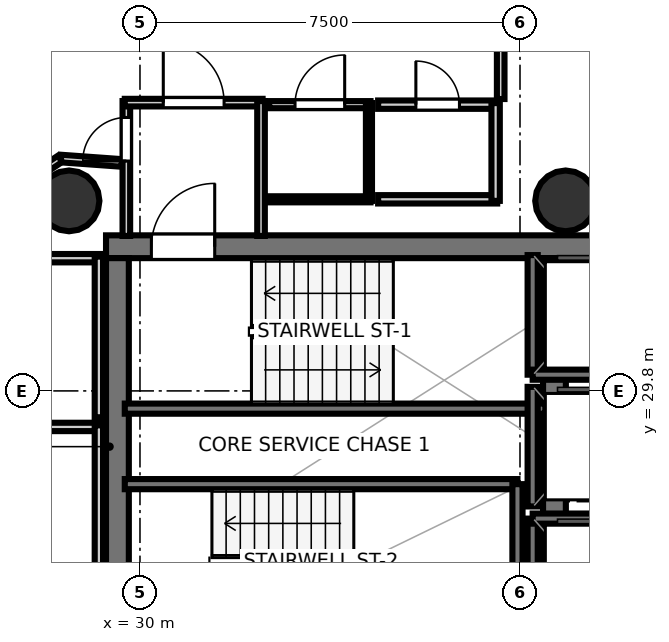
"""IFC4 building model, lengths in metres.
Left out: names, types, materials, properties, quantities, classifications, styles, units other than length and angle.
Written with IfcOpenShell. Run it as: python <this file> out.ifc"""

import sys

from ifc_helpers import new_model, si_unit, direction, frame, frame_2d, origin, origin_2d, place, context, subcontext, project, spatial, rectangle, hollow_circle, extrude, element, fill, save


model = new_model("IFC4")
c1 = context("Model", 3, precision=1e-05, world=origin(), true_north=direction((0.0, 1.0)))
c2 = subcontext(c1, "Body", "Model", "MODEL_VIEW")
j1 = project(units=[si_unit("LENGTHUNIT", "METRE"), si_unit("PLANEANGLEUNIT", "RADIAN")], contexts=[c1])
p1 = place(None, origin())
s1 = spatial("IfcSite", under=j1, at=p1, CompositionType="ELEMENT")
p2 = place(p1, origin())
s2 = spatial("IfcBuilding", under=s1, at=p2, CompositionType="ELEMENT")
p3 = place(p2, frame((0.0, 0.0, 215.1)))
s3 = spatial("IfcBuildingStorey", under=s2, at=p3, CompositionType="ELEMENT", Elevation=215.1)
p4 = place(p3, frame((29.33, 32.645, 0.0), z_axis=(0.0, 0.0, 1.0), x_axis=(1.0, 0.0, 0.0)))
e1 = element("IfcWall", 1, at=p4, inside=s3, PredefinedType="SHEAR", context=c2, shape_type="SweptSolid", body=[
    extrude(rectangle(XDim=10.52, YDim=0.45, at=frame_2d((5.26, 0.0))), origin(), (0.0, 0.0, 1.0), 3.52),
])
p5 = place(p4, frame((0.895, 0.0, 0.0)))
e2 = element("IfcOpeningElement", 2, at=p5, cuts=e1, PredefinedType="OPENING", context=c2, shape_type="SweptSolid", body=[
    extrude(rectangle(XDim=1.25, YDim=2.15, at=frame_2d((0.625, 1.075))), frame((0.0, 0.235, 0.0), z_axis=(0.0, -1.0, 0.0), x_axis=(1.0, 0.0, 0.0)), (0.0, 0.0, 1.0), 0.47),
])
for number, where, z_axis, x_axis in (
    (3, (29.555, 24.98, 0.0), (0.0, 0.0, 1.0), (0.0, 1.0, 0.0)),
    (4, (38.18, 24.98, 0.0), (0.0, 0.0, 1.0), (0.0, 1.0, 0.0)),
):
    element("IfcWall", number, at=place(p3, frame(where, z_axis=z_axis, x_axis=x_axis)), inside=s3, PredefinedType="SHEAR", context=c2, shape_type="SweptSolid", body=[
        extrude(rectangle(XDim=7.44, YDim=0.45, at=frame_2d((3.72, 0.0))), origin(), (0.0, 0.0, 1.0), 3.52),
    ])
for number, where, z_axis, x_axis in (
    (5, (28.6, 33.55, 0.0), (0.0, 0.0, 1.0), (1.0, 0.0, 0.0)),
    (6, (38.4, 33.55, 0.0), (0.0, 0.0, 1.0), (1.0, 0.0, 0.0)),
):
    element("IfcColumn", number, at=place(p3, frame(where, z_axis=z_axis, x_axis=x_axis)), inside=s3, PredefinedType="COLUMN", context=c2, shape_type="SweptSolid", body=[
        extrude(hollow_circle(Radius=0.6, WallThickness=0.03, at=origin_2d()), origin(), (0.0, 0.0, 1.0), 3.7),
    ])
p6 = place(p3, frame((29.7, 29.45, 0.0), z_axis=(0.0, 0.0, 1.0), x_axis=(1.0, 0.0, 0.0)))
e7 = element("IfcWall", 7, at=p6, inside=s3, PredefinedType="SOLIDWALL", context=c2, shape_type="SweptSolid", body=[
    extrude(rectangle(XDim=8.3, YDim=0.2, at=frame_2d((4.15, 0.0))), origin(), (0.0, 0.0, 1.0), 3.52),
])
p7 = place(p3, frame((29.7, 27.96, 0.0), z_axis=(0.0, 0.0, 1.0), x_axis=(1.0, 0.0, 0.0)))
e8 = element("IfcWall", 8, at=p7, inside=s3, PredefinedType="SOLIDWALL", context=c2, shape_type="SweptSolid", body=[
    extrude(rectangle(XDim=7.75, YDim=0.2, at=frame_2d((3.875, 0.0))), origin(), (0.0, 0.0, 1.0), 3.52),
])
p8 = place(p3, frame((37.45, 24.9, 0.0), z_axis=(0.0, 0.0, 1.0), x_axis=(0.0, 1.0, 0.0)))
e9 = element("IfcWall", 9, at=p8, inside=s3, PredefinedType="SOLIDWALL", context=c2, shape_type="SweptSolid", body=[
    extrude(rectangle(XDim=3.06, YDim=0.2, at=frame_2d((1.53, 0.0))), origin(), (0.0, 0.0, 1.0), 3.52),
])
p9 = place(p3, frame((37.75, 30.12, 0.0), z_axis=(0.0, 0.0, 1.0), x_axis=(0.0, 1.0, 0.0)))
e10 = element("IfcWall", 10, at=p9, inside=s3, PredefinedType="SOLIDWALL", context=c2, shape_type="SweptSolid", body=[
    extrude(rectangle(XDim=2.36, YDim=0.2, at=frame_2d((1.18, 0.0))), origin(), (0.0, 0.0, 1.0), 3.52),
])
p10 = place(p3, frame((37.75, 30.12, 0.0), z_axis=(0.0, 0.0, 1.0), x_axis=(1.0, 0.0, 0.0)))
e11 = element("IfcWall", 11, at=p10, inside=s3, PredefinedType="SOLIDWALL", context=c2, shape_type="SweptSolid", body=[
    extrude(rectangle(XDim=2.1, YDim=0.2, at=frame_2d((1.05, 0.0))), origin(), (0.0, 0.0, 1.0), 3.52),
])
p11 = place(p3, frame((37.75, 24.92, 0.0), z_axis=(0.0, 0.0, 1.0), x_axis=(0.0, 1.0, 0.0)))
e12 = element("IfcWall", 12, at=p11, inside=s3, PredefinedType="SOLIDWALL", context=c2, shape_type="SweptSolid", body=[
    extrude(rectangle(XDim=2.36, YDim=0.2, at=frame_2d((1.18, 0.0))), origin(), (0.0, 0.0, 1.0), 3.52),
])
p12 = place(p3, frame((37.75, 27.28, 0.0), z_axis=(0.0, 0.0, 1.0), x_axis=(1.0, 0.0, 0.0)))
e13 = element("IfcWall", 13, at=p12, inside=s3, PredefinedType="SOLIDWALL", context=c2, shape_type="SweptSolid", body=[
    extrude(rectangle(XDim=2.1, YDim=0.2, at=frame_2d((1.05, 0.0))), origin(), (0.0, 0.0, 1.0), 3.52),
])
p13 = place(p3, frame((37.75, 27.52, 0.0), z_axis=(0.0, 0.0, 1.0), x_axis=(0.0, 1.0, 0.0)))
e14 = element("IfcWall", 14, at=p13, inside=s3, PredefinedType="SOLIDWALL", context=c2, shape_type="SweptSolid", body=[
    extrude(rectangle(XDim=2.36, YDim=0.2, at=frame_2d((1.18, 0.0))), origin(), (0.0, 0.0, 1.0), 3.52),
])
p14 = place(p3, frame((29.731, 32.858, 0.0), z_axis=(0.0, 0.0, 1.0), x_axis=(0.0, 1.0, 0.0)))
e15 = element("IfcWall", 15, at=p14, inside=s3, PredefinedType="PARTITIONING", context=c2, shape_type="SweptSolid", body=[
    extrude(rectangle(XDim=2.662, YDim=0.15, at=frame_2d((1.331, 0.0))), origin(), (0.0, 0.0, 1.0), 2.84),
])
p15 = place(p14, frame((1.478, 0.0, 0.0)))
e16 = element("IfcOpeningElement", 16, at=p15, cuts=e15, PredefinedType="OPENING", context=c2, shape_type="SweptSolid", body=[
    extrude(rectangle(XDim=0.86, YDim=2.05, at=frame_2d((0.43, 1.025))), frame((0.0, 0.085, 0.0), z_axis=(0.0, -1.0, 0.0), x_axis=(1.0, 0.0, 0.0)), (0.0, 0.0, 1.0), 0.17),
])
p16 = place(p3, frame((29.7, 35.489, 0.0), z_axis=(0.0, 0.0, 1.0), x_axis=(1.0, 0.0, 0.0)))
e17 = element("IfcWall", 17, at=p16, inside=s3, PredefinedType="PARTITIONING", context=c2, shape_type="SweptSolid", body=[
    extrude(rectangle(XDim=2.72, YDim=0.15, at=frame_2d((1.36, 0.0))), origin(), (0.0, 0.0, 1.0), 2.84),
])
p17 = place(p16, frame((0.76, 0.0, 0.0)))
e18 = element("IfcOpeningElement", 18, at=p17, cuts=e17, PredefinedType="OPENING", context=c2, shape_type="SweptSolid", body=[
    extrude(rectangle(XDim=1.2, YDim=2.15, at=frame_2d((0.6, 1.075))), frame((0.0, 0.085, 0.0), z_axis=(0.0, -1.0, 0.0), x_axis=(1.0, 0.0, 0.0)), (0.0, 0.0, 1.0), 0.17),
])
p18 = place(p3, frame((32.389, 35.52, 0.0), z_axis=(0.0, 0.0, 1.0), x_axis=(0.0, -1.0, 0.0)))
e19 = element("IfcWall", 19, at=p18, inside=s3, PredefinedType="PARTITIONING", context=c2, shape_type="SweptSolid", body=[
    extrude(rectangle(XDim=2.662, YDim=0.15, at=frame_2d((1.331, 0.0))), origin(), (0.0, 0.0, 1.0), 2.84),
])
p19 = place(p3, frame((34.55, 33.581, 0.0), z_axis=(0.0, 0.0, 1.0), x_axis=(-1.0, 0.0, 0.0)))
e20 = element("IfcWall", 20, at=p19, inside=s3, PredefinedType="PARTITIONING", context=c2, shape_type="SweptSolid", body=[
    extrude(rectangle(XDim=2.0, YDim=0.12, at=frame_2d((1.0, 0.0))), origin(), (0.0, 0.0, 1.0), 2.84),
])
p20 = place(p3, frame((32.55, 35.449, 0.0), z_axis=(0.0, 0.0, 1.0), x_axis=(1.0, 0.0, 0.0)))
e21 = element("IfcWall", 21, at=p20, inside=s3, PredefinedType="PARTITIONING", context=c2, shape_type="SweptSolid", body=[
    extrude(rectangle(XDim=2.0, YDim=0.14, at=frame_2d((1.0, 0.0))), origin(), (0.0, 0.0, 1.0), 2.84),
])
p21 = place(p20, frame((0.51, 0.0, 0.0)))
e22 = element("IfcOpeningElement", 22, at=p21, cuts=e21, PredefinedType="OPENING", context=c2, shape_type="SweptSolid", body=[
    extrude(rectangle(XDim=0.98, YDim=2.1, at=frame_2d((0.49, 1.05))), frame((0.0, 0.08, 0.0), z_axis=(0.0, -1.0, 0.0), x_axis=(1.0, 0.0, 0.0)), (0.0, 0.0, 1.0), 0.16),
])
p22 = place(p3, frame((34.519, 35.48, 0.0), z_axis=(0.0, 0.0, 1.0), x_axis=(0.0, -1.0, 0.0)))
e23 = element("IfcWall", 23, at=p22, inside=s3, PredefinedType="PARTITIONING", context=c2, shape_type="SweptSolid", body=[
    extrude(rectangle(XDim=1.93, YDim=0.12, at=frame_2d((0.965, 0.0))), origin(), (0.0, 0.0, 1.0), 2.84),
])
p23 = place(p3, frame((37.05, 33.581, 0.0), z_axis=(0.0, 0.0, 1.0), x_axis=(-1.0, 0.0, 0.0)))
e24 = element("IfcWall", 24, at=p23, inside=s3, PredefinedType="PLUMBINGWALL", context=c2, shape_type="SweptSolid", body=[
    extrude(rectangle(XDim=2.35, YDim=0.165, at=frame_2d((1.175, 0.0))), origin(), (0.0, 0.0, 1.0), 2.84),
])
p24 = place(p3, frame((34.7, 35.449, 0.0), z_axis=(0.0, 0.0, 1.0), x_axis=(1.0, 0.0, 0.0)))
e25 = element("IfcWall", 25, at=p24, inside=s3, PredefinedType="PLUMBINGWALL", context=c2, shape_type="SweptSolid", body=[
    extrude(rectangle(XDim=2.35, YDim=0.165, at=frame_2d((1.175, 0.0))), origin(), (0.0, 0.0, 1.0), 2.84),
])
p25 = place(p24, frame((0.745, 0.0, 0.0)))
e26 = element("IfcOpeningElement", 26, at=p25, cuts=e25, PredefinedType="OPENING", context=c2, shape_type="SweptSolid", body=[
    extrude(rectangle(XDim=0.86, YDim=2.05, at=frame_2d((0.43, 1.025))), frame((0.0, 0.093, 0.0), z_axis=(0.0, -1.0, 0.0), x_axis=(1.0, 0.0, 0.0)), (0.0, 0.0, 1.0), 0.185),
])
p26 = place(p3, frame((37.019, 35.48, 0.0), z_axis=(0.0, 0.0, 1.0), x_axis=(0.0, -1.0, 0.0)))
e27 = element("IfcWall", 27, at=p26, inside=s3, PredefinedType="PLUMBINGWALL", context=c2, shape_type="SweptSolid", body=[
    extrude(rectangle(XDim=1.93, YDim=0.165, at=frame_2d((0.965, 0.0))), origin(), (0.0, 0.0, 1.0), 2.84),
])
p27 = place(p3, frame((27.72, 29.089, 0.0), z_axis=(0.0, 0.0, 1.0), x_axis=(1.0, 0.0, 0.0)))
e28 = element("IfcWall", 28, at=p27, inside=s3, PredefinedType="PLUMBINGWALL", context=c2, shape_type="SweptSolid", body=[
    extrude(rectangle(XDim=1.5, YDim=0.165, at=frame_2d((0.75, 0.0))), origin(), (0.0, 0.0, 1.0), 2.84),
])
p28 = place(p3, frame((29.189, 29.12, 0.0), z_axis=(0.0, 0.0, 1.0), x_axis=(0.0, -1.0, 0.0)))
e29 = element("IfcWall", 29, at=p28, inside=s3, PredefinedType="PLUMBINGWALL", context=c2, shape_type="SweptSolid", body=[
    extrude(rectangle(XDim=4.12, YDim=0.165, at=frame_2d((2.06, 0.0))), origin(), (0.0, 0.0, 1.0), 2.84),
])
p29 = place(p3, frame((27.72, 32.419, 0.0), z_axis=(0.0, 0.0, 1.0), x_axis=(1.0, 0.0, 0.0)))
e30 = element("IfcWall", 30, at=p29, inside=s3, PredefinedType="PLUMBINGWALL", context=c2, shape_type="SweptSolid", body=[
    extrude(rectangle(XDim=1.5, YDim=0.165, at=frame_2d((0.75, 0.0))), origin(), (0.0, 0.0, 1.0), 2.84),
])
p30 = place(p3, frame((29.189, 32.45, 0.0), z_axis=(0.0, 0.0, 1.0), x_axis=(0.0, -1.0, 0.0)))
e31 = element("IfcWall", 31, at=p30, inside=s3, PredefinedType="PLUMBINGWALL", context=c2, shape_type="SweptSolid", body=[
    extrude(rectangle(XDim=3.17, YDim=0.165, at=frame_2d((1.585, 0.0))), origin(), (0.0, 0.0, 1.0), 2.84),
])
p31 = place(p3, frame((37.119, 37.816, 0.0), z_axis=(0.0, 0.0, 1.0), x_axis=(0.0, -1.0, 0.0)))
e32 = element("IfcWall", 32, at=p31, inside=s3, PredefinedType="PARTITIONING", context=c2, shape_type="SweptSolid", body=[
    extrude(rectangle(XDim=2.256, YDim=0.15, at=frame_2d((1.128, 0.0))), origin(), (0.0, 0.0, 1.0), 2.84),
])
p32 = place(p3, frame((29.64, 34.299, 0.0), z_axis=(0.0, 0.0, 1.0), x_axis=(-0.997392224386, 0.072171675429, 0.0)))
e33 = element("IfcWall", 33, at=p32, inside=s3, PredefinedType="PARTITIONING", context=c2, shape_type="SweptSolid", body=[
    extrude(rectangle(XDim=1.201, YDim=0.15, at=frame_2d((0.601, 0.0))), origin(), (0.0, 0.0, 1.0), 2.84),
])
p33 = place(p3, frame((28.423, 34.38, 0.0), z_axis=(0.0, 0.0, 1.0), x_axis=(-0.831571279003, -0.555418047903, 0.0)))
e34 = element("IfcWall", 34, at=p33, inside=s3, PredefinedType="PARTITIONING", context=c2, shape_type="SweptSolid", body=[
    extrude(rectangle(XDim=0.628, YDim=0.15, at=frame_2d((0.314, 0.0))), origin(), (0.0, 0.0, 1.0), 2.84),
])
p34 = place(p5, origin())
e35 = element("IfcDoor", 35, at=p34, inside=s3, OperationType="SINGLE_SWING_RIGHT", PredefinedType="DOOR", context=c2, shape_type="SweptSolid", body=[
    extrude(rectangle(XDim=1.25, YDim=2.15, at=frame_2d((0.625, 1.075))), frame((0.0, 0.025, 0.0), z_axis=(0.0, -1.0, 0.0), x_axis=(1.0, 0.0, 0.0)), (0.0, 0.0, 1.0), 0.05),
])
fill(e2, e35)
p35 = place(p17, origin())
e36 = element("IfcDoor", 36, at=p35, inside=s3, OperationType="SINGLE_SWING_LEFT", PredefinedType="DOOR", context=c2, shape_type="SweptSolid", body=[
    extrude(rectangle(XDim=1.2, YDim=2.15, at=frame_2d((0.6, 1.075))), frame((0.0, 0.025, 0.0), z_axis=(0.0, -1.0, 0.0), x_axis=(1.0, 0.0, 0.0)), (0.0, 0.0, 1.0), 0.05),
])
fill(e18, e36)
p36 = place(p21, origin())
e37 = element("IfcDoor", 37, at=p36, inside=s3, OperationType="SINGLE_SWING_RIGHT", PredefinedType="DOOR", context=c2, shape_type="SweptSolid", body=[
    extrude(rectangle(XDim=0.98, YDim=2.1, at=frame_2d((0.49, 1.05))), frame((0.0, 0.025, 0.0), z_axis=(0.0, -1.0, 0.0), x_axis=(1.0, 0.0, 0.0)), (0.0, 0.0, 1.0), 0.05),
])
fill(e22, e37)
p37 = place(p25, origin())
e38 = element("IfcDoor", 38, at=p37, inside=s3, OperationType="SINGLE_SWING_LEFT", PredefinedType="DOOR", context=c2, shape_type="SweptSolid", body=[
    extrude(rectangle(XDim=0.86, YDim=2.05, at=frame_2d((0.43, 1.025))), frame((0.0, 0.025, 0.0), z_axis=(0.0, -1.0, 0.0), x_axis=(1.0, 0.0, 0.0)), (0.0, 0.0, 1.0), 0.05),
])
fill(e26, e38)
p38 = place(p15, origin())
e39 = element("IfcDoor", 39, at=p38, inside=s3, OperationType="SINGLE_SWING_LEFT", PredefinedType="DOOR", context=c2, shape_type="SweptSolid", body=[
    extrude(rectangle(XDim=0.86, YDim=2.05, at=frame_2d((0.43, 1.025))), frame((0.0, 0.025, 0.0), z_axis=(0.0, -1.0, 0.0), x_axis=(1.0, 0.0, 0.0)), (0.0, 0.0, 1.0), 0.05),
])
fill(e16, e39)
save(model, sys.argv[1])
